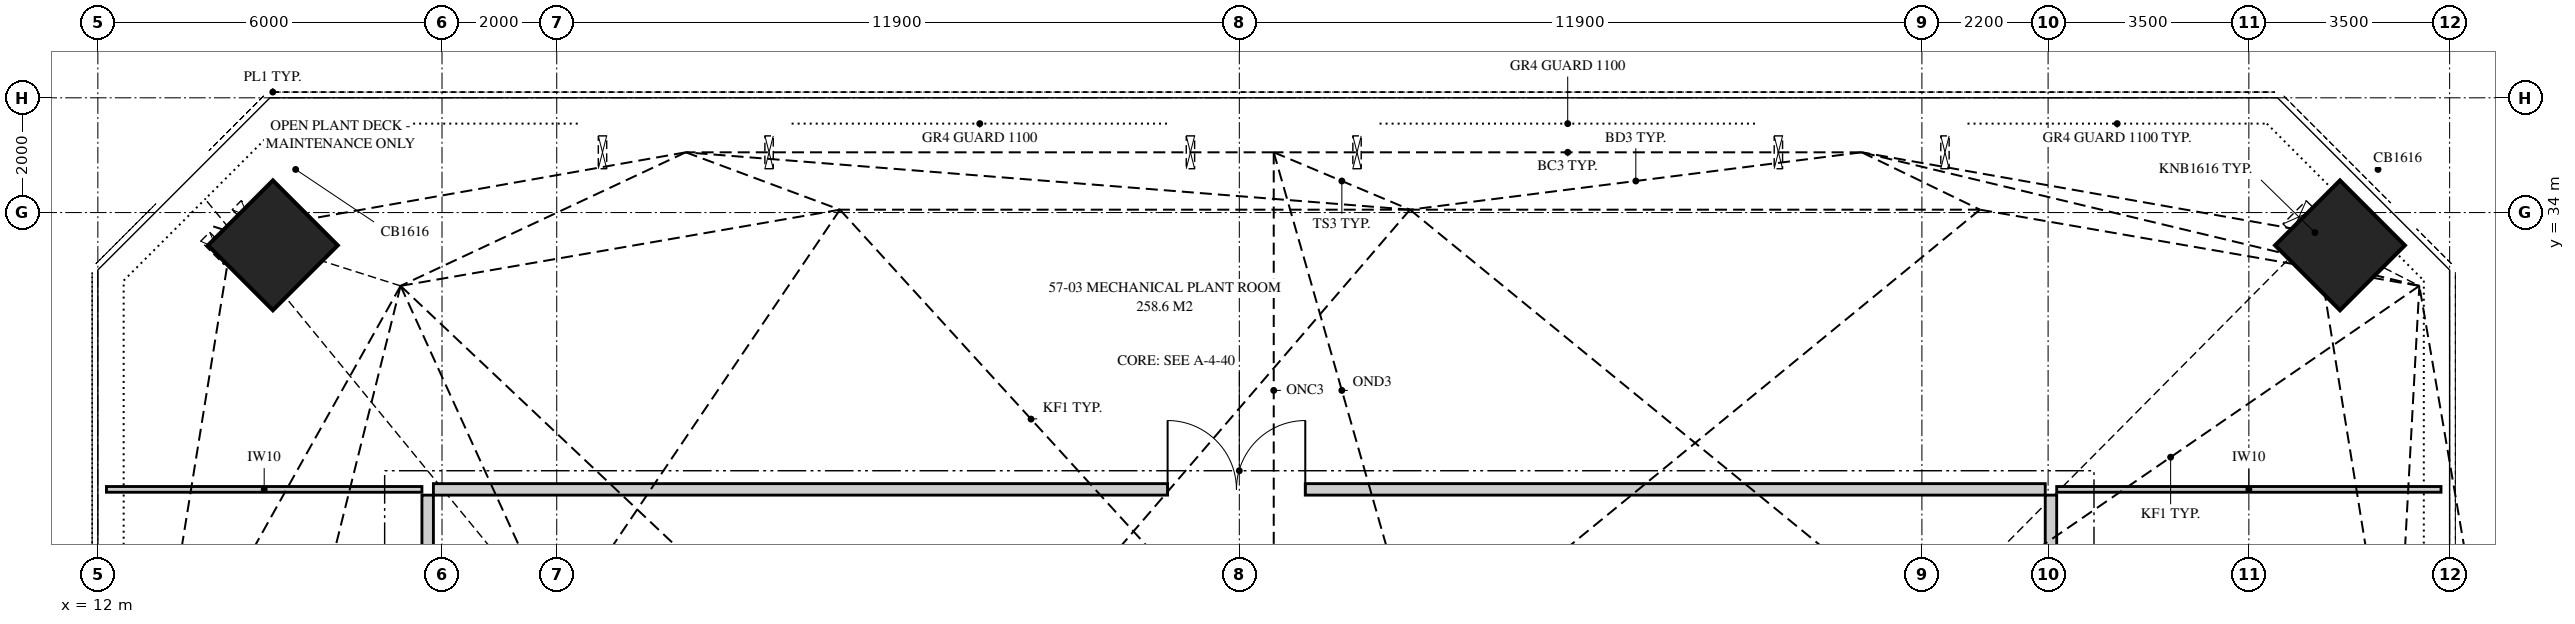
"""IFC4 building model, lengths in metres.
Left out: names, types, materials, properties, quantities, classifications, styles, units other than length and angle.
Written with IfcOpenShell. Run it as: python <this file> out.ifc"""

import sys

from ifc_helpers import new_model, si_unit, direction, frame, frame_2d, origin, origin_2d, place, context, subcontext, project, spatial, polyline, rectangle, hollow_rectangle, outline, extrude, element, fill, save


model = new_model("IFC4")
c1 = context("Model", 3, precision=1e-05, world=origin(), true_north=direction((0.0, 1.0)))
c2 = subcontext(c1, "Body", "Model", "MODEL_VIEW")
j1 = project(units=[si_unit("LENGTHUNIT", "METRE"), si_unit("PLANEANGLEUNIT", "RADIAN")], contexts=[c1])
p1 = place(None, origin())
s1 = spatial("IfcSite", under=j1, at=p1, CompositionType="ELEMENT")
p2 = place(p1, origin())
s2 = spatial("IfcBuilding", under=s1, at=p2, CompositionType="ELEMENT")
p3 = place(p2, frame((0.0, 0.0, 207.95)))
s3 = spatial("IfcBuildingStorey", under=s2, at=p3, CompositionType="ELEMENT", Elevation=207.95)
p4 = place(p3, frame((50.789, 33.582, 0.377), z_axis=(0.337034427987, -0.172065182694, 0.925635655783), x_axis=(-0.672443835431, -0.732114860607, 0.10875255891)))
e1 = element("IfcColumn", 1, at=p4, inside=s3, PredefinedType="COLUMN", context=c2, shape_type="SweptSolid", body=[
    extrude(hollow_rectangle(XDim=1.6, YDim=1.6, WallThickness=0.125, at=origin_2d()), origin(), (0.0, 0.0, 1.0), 4.994),
])
p5 = place(p3, frame((14.686, 33.545, 0.576), z_axis=(0.49913593482, -0.158364072328, 0.851929656232), x_axis=(0.536544088104, -0.715531684095, -0.447364337623)))
e2 = element("IfcColumn", 2, at=p5, inside=s3, PredefinedType="COLUMN", context=c2, shape_type="SweptSolid", body=[
    extrude(hollow_rectangle(XDim=1.6, YDim=1.6, WallThickness=0.125, at=origin_2d()), origin(), (0.0, 0.0, 1.0), 5.193),
])
p6 = place(p3, frame((17.85, 29.175, 0.0), z_axis=(0.0, 0.0, 1.0), x_axis=(1.0, 0.0, 0.0)))
e3 = element("IfcWall", 3, at=p6, inside=s3, PredefinedType="PARTITIONING", context=c2, shape_type="SweptSolid", body=[
    extrude(outline(polyline([(28.1, 1.2), (28.1, 4.72), (23.48, 4.72), (23.48, 4.141), (22.49, 4.141), (22.49, 4.72), (21.506, 4.72), (21.506, 4.141), (20.516, 4.141), (20.516, 4.72), (17.281, 4.72), (17.281, 4.245), (16.769, 4.245), (16.769, 4.72), (13.232, 4.72), (13.232, 4.141), (12.437, 4.141), (12.437, 4.72), (11.948, 4.72), (11.948, 4.141), (11.126, 4.141), (11.126, 4.72), (4.143, 4.72), (4.143, 4.141), (2.733, 4.141), (2.733, 4.72), (1.35, 4.72), (1.35, 4.141), (0.74, 4.141), (0.74, 4.72), (0.0, 4.72), (0.0, 1.2), (0.892, 1.2), (0.892, 0.0), (27.554, 0.0), (27.554, 1.2), (28.1, 1.2)]), holes=[polyline([(16.106, 3.278), (16.617, 3.359), (16.617, 2.855), (16.556, 2.728), (16.045, 2.646), (16.045, 3.15), (16.106, 3.278)])]), frame((0.0, 0.1, 0.0), z_axis=(0.0, -1.0, 0.0), x_axis=(1.0, 0.0, 0.0)), (0.0, 0.0, 1.0), 0.2),
])
p7 = place(p6, frame((12.8, 0.0, 0.0)))
e4 = element("IfcOpeningElement", 4, at=p7, cuts=e3, PredefinedType="OPENING", context=c2, shape_type="SweptSolid", body=[
    extrude(rectangle(XDim=2.4, YDim=2.4, at=frame_2d((1.2, 1.2))), frame((0.0, 0.11, 0.0), z_axis=(0.0, -1.0, 0.0), x_axis=(1.0, 0.0, 0.0)), (0.0, 0.0, 1.0), 0.22),
])
p8 = place(p3, frame((17.75, 27.525, 0.0), z_axis=(0.0, 0.0, 1.0), x_axis=(0.0, 1.0, 0.0)))
e5 = element("IfcWall", 5, at=p8, inside=s3, PredefinedType="PARTITIONING", context=c2, shape_type="SweptSolid", body=[
    extrude(outline(polyline([(0.0, 4.72), (0.0, 0.0), (1.061, 0.0), (1.061, 1.2), (1.55, 1.2), (1.55, 4.72), (0.0, 4.72)])), frame((0.0, 0.1, 0.0), z_axis=(0.0, -1.0, 0.0), x_axis=(1.0, 0.0, 0.0)), (0.0, 0.0, 1.0), 0.2),
])
p9 = place(p3, frame((46.05, 27.525, 0.0), z_axis=(0.0, 0.0, 1.0), x_axis=(0.0, 1.0, 0.0)))
e6 = element("IfcWall", 6, at=p9, inside=s3, PredefinedType="PARTITIONING", context=c2, shape_type="SweptSolid", body=[
    extrude(outline(polyline([(1.55, 1.2), (1.55, 4.72), (1.13, 4.72), (1.13, 4.141), (0.419, 4.141), (0.419, 4.72), (0.0, 4.72), (0.0, 0.0), (0.681, 0.0), (0.681, 1.2), (1.55, 1.2)])), frame((0.0, 0.1, 0.0), z_axis=(0.0, -1.0, 0.0), x_axis=(1.0, 0.0, 0.0)), (0.0, 0.0, 1.0), 0.2),
])
p10 = place(p3, frame((12.15, 29.175, 0.0), z_axis=(0.0, 0.0, 1.0), x_axis=(1.0, 0.0, 0.0)))
e7 = element("IfcWall", 7, at=p10, inside=s3, PredefinedType="PARTITIONING", context=c2, shape_type="SweptSolid", body=[
    extrude(outline(polyline([(5.5, 1.2), (5.5, 4.72), (4.77, 4.72), (4.77, 3.72), (3.714, 3.72), (3.714, 4.72), (0.0, 4.72), (0.0, 0.0), (5.177, 0.0), (5.177, 1.2), (5.5, 1.2)]), holes=[polyline([(2.586, 1.219), (2.586, 2.269), (2.646, 2.339), (3.694, 2.628), (3.694, 1.578), (3.633, 1.508), (2.586, 1.219)])]), frame((0.0, 0.05, 0.0), z_axis=(0.0, -1.0, 0.0), x_axis=(1.0, 0.0, 0.0)), (0.0, 0.0, 1.0), 0.1),
])
p11 = place(p3, frame((46.15, 29.175, 0.0), z_axis=(0.0, 0.0, 1.0), x_axis=(1.0, 0.0, 0.0)))
e8 = element("IfcWall", 8, at=p11, inside=s3, PredefinedType="PARTITIONING", context=c2, shape_type="SweptSolid", body=[
    extrude(outline(polyline([(0.812, 0.0), (6.7, 0.0), (6.7, 3.72), (6.416, 3.72), (6.416, 4.72), (1.66, 4.72), (1.66, 4.141), (0.682, 4.141), (0.682, 4.72), (0.0, 4.72), (0.0, 1.2), (0.812, 1.2), (0.812, 0.0)]), holes=[polyline([(5.665, 1.329), (5.665, 2.411), (5.671, 2.485), (6.592, 2.518), (6.592, 1.435), (6.585, 1.361), (5.665, 1.329)])]), frame((0.0, 0.05, 0.0), z_axis=(0.0, -1.0, 0.0), x_axis=(1.0, 0.0, 0.0)), (0.0, 0.0, 1.0), 0.1),
])
p12 = place(p7, origin())
e9 = element("IfcDoor", 9, at=p12, inside=s3, OperationType="DOUBLE_DOOR_SINGLE_SWING", PredefinedType="DOOR", context=c2, shape_type="SweptSolid", body=[
    extrude(rectangle(XDim=2.4, YDim=2.4, at=frame_2d((1.2, 1.2))), frame((0.0, 0.025, 0.0), z_axis=(0.0, -1.0, 0.0), x_axis=(1.0, 0.0, 0.0)), (0.0, 0.0, 1.0), 0.05),
])
fill(e4, e9)
save(model, sys.argv[1])
